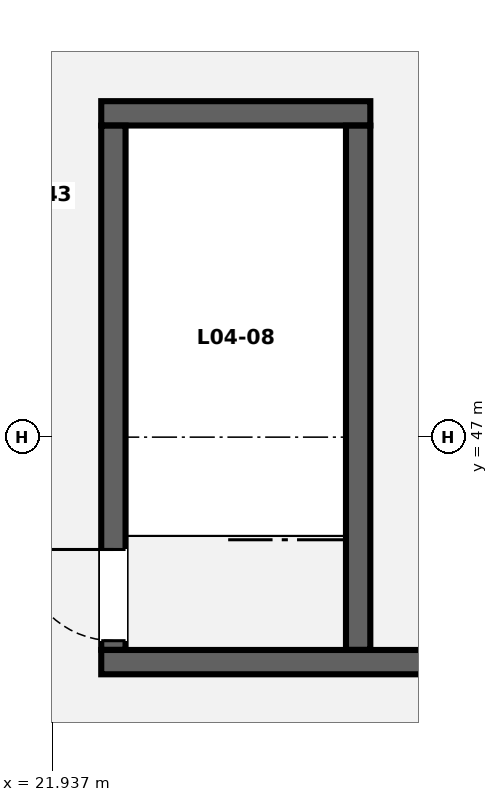
"""IFC4 building model, lengths in metres.
Left out: names, types, materials, properties, quantities, classifications, styles, units other than length and angle.
Written with IfcOpenShell. Run it as: python <this file> out.ifc"""

import sys

from ifc_helpers import new_model, si_unit, direction, frame, frame_2d, origin, place, context, subcontext, project, spatial, rectangle, extrude, element, fill, save


model = new_model("IFC4")
c1 = context("Model", 3, precision=1e-05, world=origin(), true_north=direction((0.0, 1.0)))
c2 = subcontext(c1, "Body", "Model", "MODEL_VIEW")
j1 = project(units=[si_unit("LENGTHUNIT", "METRE"), si_unit("PLANEANGLEUNIT", "RADIAN")], contexts=[c1])
p1 = place(None, origin())
s1 = spatial("IfcSite", under=j1, at=p1, CompositionType="ELEMENT")
p2 = place(p1, origin())
s2 = spatial("IfcBuilding", under=s1, at=p2, CompositionType="ELEMENT")
p3 = place(p2, frame((0.0, 0.0, 17.5)))
s3 = spatial("IfcBuildingStorey", under=s2, at=p3, CompositionType="ELEMENT", Elevation=17.5)
p4 = place(p3, frame((22.58, 44.04, 0.0), z_axis=(0.0, 0.0, 1.0), x_axis=(1.0, 0.0, 0.0)))
e1 = element("IfcWall", 1, at=p4, inside=s3, PredefinedType="SHEAR", context=c2, shape_type="SweptSolid", body=[
    extrude(rectangle(XDim=4.485, YDim=0.32, at=frame_2d((2.242, 0.0))), origin(), (0.0, 0.0, 1.0), 4.0),
])
p5 = place(p3, frame((22.58, 51.26, 0.0), z_axis=(0.0, 0.0, 1.0), x_axis=(1.0, 0.0, 0.0)))
e2 = element("IfcWall", 2, at=p5, inside=s3, PredefinedType="SHEAR", context=c2, shape_type="SweptSolid", body=[
    extrude(rectangle(XDim=3.54, YDim=0.32, at=frame_2d((1.77, 0.0))), origin(), (0.0, 0.0, 1.0), 4.0),
])
p6 = place(p3, frame((22.74, 44.202, 0.0), z_axis=(0.0, 0.0, 1.0), x_axis=(0.0, 1.0, 0.0)))
e3 = element("IfcWall", 3, at=p6, inside=s3, PredefinedType="SHEAR", context=c2, shape_type="SweptSolid", body=[
    extrude(rectangle(XDim=6.896, YDim=0.32, at=frame_2d((3.448, 0.0))), origin(), (0.0, 0.0, 1.0), 4.0),
])
p7 = place(p6, frame((0.12, 0.0, 0.0)))
e4 = element("IfcOpeningElement", 4, at=p7, cuts=e3, PredefinedType="OPENING", context=c2, shape_type="SweptSolid", body=[
    extrude(rectangle(XDim=1.2, YDim=2.15, at=frame_2d((0.6, 1.075))), frame((0.0, 0.17, 0.0), z_axis=(0.0, -1.0, 0.0), x_axis=(1.0, 0.0, 0.0)), (0.0, 0.0, 1.0), 0.34),
])
p8 = place(p3, frame((25.96, 44.202, 0.0), z_axis=(0.0, 0.0, 1.0), x_axis=(0.0, 1.0, 0.0)))
e5 = element("IfcWall", 5, at=p8, inside=s3, PredefinedType="SHEAR", context=c2, shape_type="SweptSolid", body=[
    extrude(rectangle(XDim=6.896, YDim=0.32, at=frame_2d((3.448, 0.0))), origin(), (0.0, 0.0, 1.0), 4.0),
])
p9 = place(p7, origin())
e6 = element("IfcDoor", 6, at=p9, inside=s3, OperationType="SINGLE_SWING_RIGHT", PredefinedType="DOOR", context=c2, shape_type="SweptSolid", body=[
    extrude(rectangle(XDim=1.2, YDim=2.15, at=frame_2d((0.6, 1.075))), frame((0.0, 0.025, 0.0), z_axis=(0.0, -1.0, 0.0), x_axis=(1.0, 0.0, 0.0)), (0.0, 0.0, 1.0), 0.05),
])
fill(e4, e6)
save(model, sys.argv[1])
